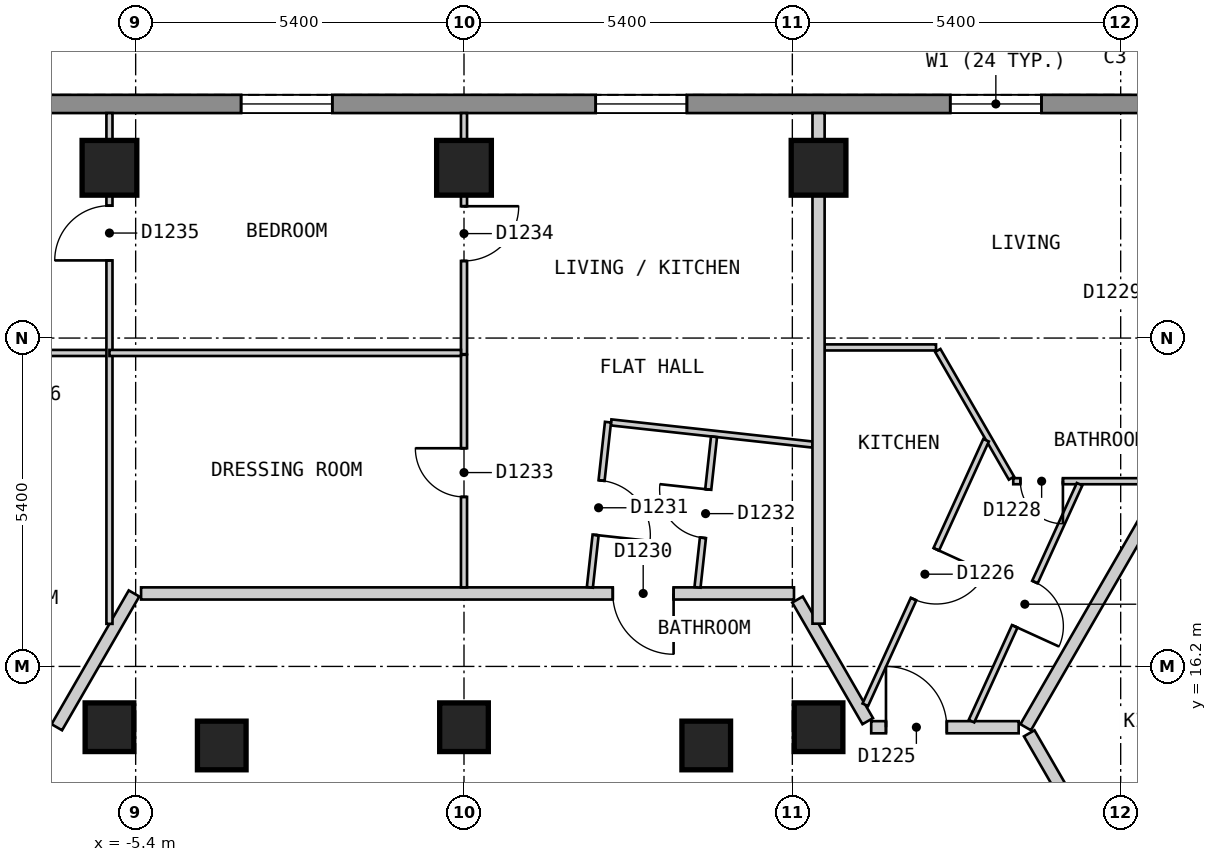
"""IFC4 building model, lengths in metres.
Left out: names, types, materials, properties, quantities, classifications, styles, units other than length and angle.
Written with IfcOpenShell. Run it as: python <this file> out.ifc"""

import sys

from ifc_helpers import new_model, si_unit, direction, frame, frame_2d, origin, origin_2d, place, context, subcontext, project, spatial, polyline, rectangle, outline, extrude, element, fill, save


model = new_model("IFC4")
c1 = context("Model", 3, precision=1e-05, world=origin(), true_north=direction((0.0, 1.0)))
c2 = subcontext(c1, "Body", "Model", "MODEL_VIEW")
j1 = project(units=[si_unit("LENGTHUNIT", "METRE"), si_unit("PLANEANGLEUNIT", "RADIAN")], contexts=[c1])
p1 = place(None, origin())
s1 = spatial("IfcSite", under=j1, at=p1, CompositionType="ELEMENT")
p2 = place(p1, origin())
s2 = spatial("IfcBuilding", under=s1, at=p2, CompositionType="ELEMENT")
p3 = place(p2, frame((0.0, 0.0, 129.6)))
s3 = spatial("IfcBuildingStorey", under=s2, at=p3, CompositionType="ELEMENT", Elevation=129.6)
for number, where, z_axis, x_axis in (
    (1, (5.831, 24.4, 0.0), (0.0, 0.0, 1.0), (-1.0, 0.0, 0.0)),
    (2, (0.0, 24.4, 0.0), (0.0, 0.0, 1.0), (-1.0, 0.0, 0.0)),
    (3, (-5.831, 24.4, 0.0), (0.0, 0.0, 1.0), (-1.0, 0.0, 0.0)),
):
    element("IfcColumn", number, at=place(p3, frame(where, z_axis=z_axis, x_axis=x_axis)), inside=s3, PredefinedType="COLUMN", context=c2, shape_type="SweptSolid", body=[
        extrude(rectangle(XDim=0.9, YDim=0.9, at=origin_2d()), origin(), (0.0, 0.0, 1.0), 3.0),
    ])
for number, where, z_axis, x_axis in (
    (4, (5.831, 15.2, 0.0), (0.0, 0.0, 1.0), (-1.0, 0.0, 0.0)),
    (5, (3.984, 14.9, 0.0), (0.0, 0.0, 1.0), (1.0, 0.0, 0.0)),
    (6, (0.0, 15.2, 0.0), (0.0, 0.0, 1.0), (-1.0, 0.0, 0.0)),
    (7, (-3.984, 14.9, 0.0), (0.0, 0.0, 1.0), (1.0, 0.0, 0.0)),
    (8, (-5.831, 15.2, 0.0), (0.0, 0.0, 1.0), (-1.0, 0.0, 0.0)),
):
    element("IfcColumn", number, at=place(p3, frame(where, z_axis=z_axis, x_axis=x_axis)), inside=s3, PredefinedType="COLUMN", context=c2, shape_type="SweptSolid", body=[
        extrude(rectangle(XDim=0.8, YDim=0.8, at=origin_2d()), origin(), (0.0, 0.0, 1.0), 3.0),
    ])
p4 = place(p3, frame((12.355, 25.45, 0.0), z_axis=(0.0, 0.0, 1.0), x_axis=(-1.0, 0.0, 0.0)))
e9 = element("IfcWall", 9, at=p4, inside=s3, PredefinedType="SOLIDWALL", context=c2, shape_type="SweptSolid", body=[
    extrude(outline(polyline([(0.0, -0.15), (24.71, -0.15), (24.63, 0.15), (0.08, 0.15), (0.0, -0.15)])), origin(), (0.0, 0.0, 1.0), 2.7),
])
p5 = place(p4, frame((2.858, 0.0, 0.15)))
e10 = element("IfcOpeningElement", 10, at=p5, cuts=e9, PredefinedType="OPENING", context=c2, shape_type="SweptSolid", body=[
    extrude(rectangle(XDim=1.5, YDim=2.1, at=frame_2d((0.75, 1.05))), frame((0.0, 0.16, 0.0), z_axis=(0.0, -1.0, 0.0), x_axis=(1.0, 0.0, 0.0)), (0.0, 0.0, 1.0), 0.32),
])
p6 = place(p4, frame((8.689, 0.0, 0.15)))
e11 = element("IfcOpeningElement", 11, at=p6, cuts=e9, PredefinedType="OPENING", context=c2, shape_type="SweptSolid", body=[
    extrude(rectangle(XDim=1.5, YDim=2.1, at=frame_2d((0.75, 1.05))), frame((0.0, 0.16, 0.0), z_axis=(0.0, -1.0, 0.0), x_axis=(1.0, 0.0, 0.0)), (0.0, 0.0, 1.0), 0.32),
])
p7 = place(p4, frame((14.521, 0.0, 0.15)))
e12 = element("IfcOpeningElement", 12, at=p7, cuts=e9, PredefinedType="OPENING", context=c2, shape_type="SweptSolid", body=[
    extrude(rectangle(XDim=1.5, YDim=2.1, at=frame_2d((0.75, 1.05))), frame((0.0, 0.16, 0.0), z_axis=(0.0, -1.0, 0.0), x_axis=(1.0, 0.0, 0.0)), (0.0, 0.0, 1.0), 0.32),
])
p8 = place(p4, frame((20.352, 0.0, 0.15)))
e13 = element("IfcOpeningElement", 13, at=p8, cuts=e9, PredefinedType="OPENING", context=c2, shape_type="SweptSolid", body=[
    extrude(rectangle(XDim=1.5, YDim=2.1, at=frame_2d((0.75, 1.05))), frame((0.0, 0.16, 0.0), z_axis=(0.0, -1.0, 0.0), x_axis=(1.0, 0.0, 0.0)), (0.0, 0.0, 1.0), 0.32),
])
p9 = place(p3, frame((5.485, 17.3, 0.0), z_axis=(0.0, 0.0, 1.0), x_axis=(0.500027479704, -0.866009537788, 0.0)))
e14 = element("IfcWall", 14, at=p9, inside=s3, PredefinedType="PARTITIONING", context=c2, shape_type="SweptSolid", body=[
    extrude(rectangle(XDim=2.309, YDim=0.2, at=frame_2d((1.155, 0.0))), origin(), (0.0, 0.0, 1.0), 2.7),
])
p10 = place(p3, frame((9.296, 15.1, 0.0), z_axis=(0.0, 0.0, 1.0), x_axis=(0.499974024244, -0.866040400375, 0.0)))
e15 = element("IfcWall", 15, at=p10, inside=s3, PredefinedType="PARTITIONING", context=c2, shape_type="SweptSolid", body=[
    extrude(rectangle(XDim=16.857, YDim=0.2, at=frame_2d((8.429, 0.0))), origin(), (0.0, 0.0, 1.0), 2.7),
])
p11 = place(p10, frame((5.187, 0.0, 0.0)))
e16 = element("IfcOpeningElement", 16, at=p11, cuts=e15, PredefinedType="OPENING", context=c2, shape_type="SweptSolid", body=[
    extrude(rectangle(XDim=1.0, YDim=2.1, at=frame_2d((0.5, 1.05))), frame((0.0, 0.11, 0.0), z_axis=(0.0, -1.0, 0.0), x_axis=(1.0, 0.0, 0.0)), (0.0, 0.0, 1.0), 0.22),
])
p12 = place(p3, frame((6.697, 15.2, 0.0), z_axis=(0.0, 0.0, 1.0), x_axis=(1.0, 0.0, 0.0)))
e17 = element("IfcWall", 17, at=p12, inside=s3, PredefinedType="PARTITIONING", context=c2, shape_type="SweptSolid", body=[
    extrude(rectangle(XDim=2.425, YDim=0.2, at=frame_2d((1.212, 0.0))), origin(), (0.0, 0.0, 1.0), 2.7),
])
p13 = place(p12, frame((0.243, 0.0, 0.0)))
e18 = element("IfcOpeningElement", 18, at=p13, cuts=e17, PredefinedType="OPENING", context=c2, shape_type="SweptSolid", body=[
    extrude(rectangle(XDim=1.0, YDim=2.1, at=frame_2d((0.5, 1.05))), frame((0.0, 0.11, 0.0), z_axis=(0.0, -1.0, 0.0), x_axis=(1.0, 0.0, 0.0)), (0.0, 0.0, 1.0), 0.22),
])
p14 = place(p3, frame((-5.311, 17.4, 0.0), z_axis=(0.0, 0.0, 1.0), x_axis=(1.0, 0.0, 0.0)))
e19 = element("IfcWall", 19, at=p14, inside=s3, PredefinedType="PARTITIONING", context=c2, shape_type="SweptSolid", body=[
    extrude(rectangle(XDim=10.738, YDim=0.2, at=frame_2d((5.369, 0.0))), origin(), (0.0, 0.0, 1.0), 2.7),
])
p15 = place(p14, frame((7.758, 0.0, 0.0)))
e20 = element("IfcOpeningElement", 20, at=p15, cuts=e19, PredefinedType="OPENING", context=c2, shape_type="SweptSolid", body=[
    extrude(rectangle(XDim=1.0, YDim=2.1, at=frame_2d((0.5, 1.05))), frame((0.0, 0.11, 0.0), z_axis=(0.0, -1.0, 0.0), x_axis=(1.0, 0.0, 0.0)), (0.0, 0.0, 1.0), 0.22),
])
p16 = place(p3, frame((-6.697, 15.2, 0.0), z_axis=(0.0, 0.0, 1.0), x_axis=(0.499963722229, 0.866046347752, 0.0)))
e21 = element("IfcWall", 21, at=p16, inside=s3, PredefinedType="PARTITIONING", context=c2, shape_type="SweptSolid", body=[
    extrude(rectangle(XDim=2.54, YDim=0.2, at=frame_2d((1.27, 0.0))), origin(), (0.0, 0.0, 1.0), 2.7),
])
p17 = place(p3, frame((7.792, 21.396, 0.0), z_axis=(0.0, 0.0, 1.0), x_axis=(0.499821239653, -0.866128586522, 0.0)))
e22 = element("IfcWall", 22, at=p17, inside=s3, PredefinedType="PARTITIONING", context=c2, shape_type="SweptSolid", body=[
    extrude(rectangle(XDim=2.425, YDim=0.1, at=frame_2d((1.212, 0.0))), origin(), (0.0, 0.0, 1.0), 2.7),
])
p18 = place(p3, frame((2.419, 20.213, 0.0), z_axis=(0.0, 0.0, 1.0), x_axis=(0.994022340378, -0.109176860325, 0.0)))
e23 = element("IfcWall", 23, at=p18, inside=s3, PredefinedType="PARTITIONING", context=c2, shape_type="SweptSolid", body=[
    extrude(rectangle(XDim=3.332, YDim=0.1, at=frame_2d((1.666, 0.0))), origin(), (0.0, 0.0, 1.0), 2.7),
])
p19 = place(p3, frame((0.0, 21.325, 0.0), z_axis=(0.0, 0.0, 1.0), x_axis=(0.0, -1.0, 0.0)))
e24 = element("IfcWall", 24, at=p19, inside=s3, PredefinedType="PARTITIONING", context=c2, shape_type="SweptSolid", body=[
    extrude(rectangle(XDim=3.825, YDim=0.1, at=frame_2d((1.913, 0.0))), origin(), (0.0, 0.0, 1.0), 2.7),
])
p20 = place(p19, frame((1.537, 0.0, 0.0)))
e25 = element("IfcOpeningElement", 25, at=p20, cuts=e24, PredefinedType="OPENING", context=c2, shape_type="SweptSolid", body=[
    extrude(rectangle(XDim=0.8, YDim=2.1, at=frame_2d((0.4, 1.05))), frame((0.0, 0.06, 0.0), z_axis=(0.0, -1.0, 0.0), x_axis=(1.0, 0.0, 0.0)), (0.0, 0.0, 1.0), 0.12),
])
p21 = place(p3, frame((9.033, 19.246, 0.0), z_axis=(0.0, 0.0, 1.0), x_axis=(1.0, 0.0, 0.0)))
e26 = element("IfcWall", 26, at=p21, inside=s3, PredefinedType="PARTITIONING", context=c2, shape_type="SweptSolid", body=[
    extrude(rectangle(XDim=2.541, YDim=0.1, at=frame_2d((1.271, 0.0))), origin(), (0.0, 0.0, 1.0), 2.7),
])
p22 = place(p21, frame((0.117, 0.0, 0.0)))
e27 = element("IfcOpeningElement", 27, at=p22, cuts=e26, PredefinedType="OPENING", context=c2, shape_type="SweptSolid", body=[
    extrude(rectangle(XDim=0.7, YDim=2.1, at=frame_2d((0.35, 1.05))), frame((0.0, 0.06, 0.0), z_axis=(0.0, -1.0, 0.0), x_axis=(1.0, 0.0, 0.0)), (0.0, 0.0, 1.0), 0.12),
])
p23 = place(p3, frame((-7.652, 21.355, 0.0), z_axis=(0.0, 0.0, 1.0), x_axis=(1.0, 0.0, 0.0)))
e28 = element("IfcWall", 28, at=p23, inside=s3, PredefinedType="PARTITIONING", context=c2, shape_type="SweptSolid", body=[
    extrude(rectangle(XDim=1.821, YDim=0.1, at=frame_2d((0.911, 0.0))), origin(), (0.0, 0.0, 1.0), 2.7),
])
p24 = place(p3, frame((5.931, 21.446, 0.0), z_axis=(0.0, 0.0, 1.0), x_axis=(1.0, 0.0, 0.0)))
e29 = element("IfcWall", 29, at=p24, inside=s3, PredefinedType="PARTITIONING", context=c2, shape_type="SweptSolid", body=[
    extrude(rectangle(XDim=1.832, YDim=0.1, at=frame_2d((0.916, 0.0))), origin(), (0.0, 0.0, 1.0), 2.7),
])
p25 = place(p3, frame((8.346, 15.3, 0.0), z_axis=(0.0, 0.0, 1.0), x_axis=(0.415189790387, 0.909734817383, 0.0)))
e30 = element("IfcWall", 30, at=p25, inside=s3, PredefinedType="PARTITIONING", context=c2, shape_type="SweptSolid", body=[
    extrude(rectangle(XDim=4.282, YDim=0.1, at=frame_2d((2.141, 0.0))), origin(), (0.0, 0.0, 1.0), 2.7),
])
p26 = place(p25, frame((1.714, 0.0, 0.0)))
e31 = element("IfcOpeningElement", 31, at=p26, cuts=e30, PredefinedType="OPENING", context=c2, shape_type="SweptSolid", body=[
    extrude(rectangle(XDim=0.8, YDim=2.1, at=frame_2d((0.4, 1.05))), frame((0.0, 0.06, 0.0), z_axis=(0.0, -1.0, 0.0), x_axis=(1.0, 0.0, 0.0)), (0.0, 0.0, 1.0), 0.12),
])
p27 = place(p3, frame((6.6, 15.569, 0.0), z_axis=(0.0, 0.0, 1.0), x_axis=(0.415221636251, 0.909720282718, 0.0)))
e32 = element("IfcWall", 32, at=p27, inside=s3, PredefinedType="PARTITIONING", context=c2, shape_type="SweptSolid", body=[
    extrude(rectangle(XDim=4.783, YDim=0.1, at=frame_2d((2.391, 0.0))), origin(), (0.0, 0.0, 1.0), 2.7),
])
p28 = place(p27, frame((1.911, 0.0, 0.0)))
e33 = element("IfcOpeningElement", 33, at=p28, cuts=e32, PredefinedType="OPENING", context=c2, shape_type="SweptSolid", body=[
    extrude(rectangle(XDim=0.9, YDim=2.1, at=frame_2d((0.45, 1.05))), frame((0.0, 0.06, 0.0), z_axis=(0.0, -1.0, 0.0), x_axis=(1.0, 0.0, 0.0)), (0.0, 0.0, 1.0), 0.12),
])
p29 = place(p3, frame((2.07, 17.5, 0.0), z_axis=(0.0, 0.0, 1.0), x_axis=(0.108970694085, 0.994044962681, 0.0)))
e34 = element("IfcWall", 34, at=p29, inside=s3, PredefinedType="PARTITIONING", context=c2, shape_type="SweptSolid", body=[
    extrude(rectangle(XDim=2.733, YDim=0.1, at=frame_2d((1.367, 0.0))), origin(), (0.0, 0.0, 1.0), 2.7),
])
p30 = place(p29, frame((0.867, 0.0, 0.0)))
e35 = element("IfcOpeningElement", 35, at=p30, cuts=e34, PredefinedType="OPENING", context=c2, shape_type="SweptSolid", body=[
    extrude(rectangle(XDim=0.9, YDim=2.1, at=frame_2d((0.45, 1.05))), frame((0.0, 0.06, 0.0), z_axis=(0.0, -1.0, 0.0), x_axis=(1.0, 0.0, 0.0)), (0.0, 0.0, 1.0), 0.12),
])
p31 = place(p3, frame((3.84, 17.5, 0.0), z_axis=(0.0, 0.0, 1.0), x_axis=(0.109141067014, 0.994026271027, 0.0)))
e36 = element("IfcWall", 36, at=p31, inside=s3, PredefinedType="PARTITIONING", context=c2, shape_type="SweptSolid", body=[
    extrude(rectangle(XDim=2.492, YDim=0.1, at=frame_2d((1.246, 0.0))), origin(), (0.0, 0.0, 1.0), 2.7),
])
p32 = place(p31, frame((0.82, 0.0, 0.0)))
e37 = element("IfcOpeningElement", 37, at=p32, cuts=e36, PredefinedType="OPENING", context=c2, shape_type="SweptSolid", body=[
    extrude(rectangle(XDim=0.8, YDim=2.1, at=frame_2d((0.4, 1.05))), frame((0.0, 0.06, 0.0), z_axis=(0.0, -1.0, 0.0), x_axis=(1.0, 0.0, 0.0)), (0.0, 0.0, 1.0), 0.12),
])
p33 = place(p3, frame((0.0, 21.335, 0.0), z_axis=(0.0, 0.0, 1.0), x_axis=(0.0, 1.0, 0.0)))
e38 = element("IfcWall", 38, at=p33, inside=s3, PredefinedType="PARTITIONING", context=c2, shape_type="SweptSolid", body=[
    extrude(rectangle(XDim=3.965, YDim=0.1, at=frame_2d((1.982, 0.0))), origin(), (0.0, 0.0, 1.0), 2.7),
])
p34 = place(p33, frame((1.533, 0.0, 0.0)))
e39 = element("IfcOpeningElement", 39, at=p34, cuts=e38, PredefinedType="OPENING", context=c2, shape_type="SweptSolid", body=[
    extrude(rectangle(XDim=0.9, YDim=2.1, at=frame_2d((0.45, 1.05))), frame((0.0, 0.06, 0.0), z_axis=(0.0, -1.0, 0.0), x_axis=(1.0, 0.0, 0.0)), (0.0, 0.0, 1.0), 0.12),
])
p35 = place(p3, frame((-5.831, 16.9, 0.0), z_axis=(0.0, 0.0, 1.0), x_axis=(0.0, 1.0, 0.0)))
e40 = element("IfcWall", 40, at=p35, inside=s3, PredefinedType="PARTITIONING", context=c2, shape_type="SweptSolid", body=[
    extrude(rectangle(XDim=8.4, YDim=0.1, at=frame_2d((4.2, 0.0))), origin(), (0.0, 0.0, 1.0), 2.7),
])
p36 = place(p35, frame((5.977, 0.0, 0.0)))
e41 = element("IfcOpeningElement", 41, at=p36, cuts=e40, PredefinedType="OPENING", context=c2, shape_type="SweptSolid", body=[
    extrude(rectangle(XDim=0.9, YDim=2.1, at=frame_2d((0.45, 1.05))), frame((0.0, 0.06, 0.0), z_axis=(0.0, -1.0, 0.0), x_axis=(1.0, 0.0, 0.0)), (0.0, 0.0, 1.0), 0.12),
])
p37 = place(p3, frame((10.854, 12.6, 0.0), z_axis=(0.0, 0.0, 1.0), x_axis=(0.8660642533, 0.499932704626, 0.0)))
e42 = element("IfcWall", 42, at=p37, inside=s3, PredefinedType="PARTITIONING", context=c2, shape_type="SweptSolid", body=[
    extrude(rectangle(XDim=3.786, YDim=0.1, at=frame_2d((1.893, 0.0))), origin(), (0.0, 0.0, 1.0), 2.7),
])
p38 = place(p37, frame((1.393, 0.0, 0.0)))
e43 = element("IfcOpeningElement", 43, at=p38, cuts=e42, PredefinedType="OPENING", context=c2, shape_type="SweptSolid", body=[
    extrude(rectangle(XDim=0.9, YDim=2.1, at=frame_2d((0.45, 1.05))), frame((0.0, 0.06, 0.0), z_axis=(0.0, -1.0, 0.0), x_axis=(1.0, 0.0, 0.0)), (0.0, 0.0, 1.0), 0.12),
])
p39 = place(p3, frame((9.238, 15.2, 0.0), z_axis=(0.0, 0.0, 1.0), x_axis=(0.499890453443, 0.866088641281, 0.0)))
e44 = element("IfcWall", 44, at=p39, inside=s3, PredefinedType="PARTITIONING", context=c2, shape_type="SweptSolid", body=[
    extrude(rectangle(XDim=4.487, YDim=0.2, at=frame_2d((2.243, 0.0))), origin(), (0.0, 0.0, 1.0), 2.7),
])
p40 = place(p3, frame((5.831, 16.903, 0.0), z_axis=(0.0, 0.0, 1.0), x_axis=(0.0, 1.0, 0.0)))
e45 = element("IfcWall", 45, at=p40, inside=s3, PredefinedType="PARTITIONING", context=c2, shape_type="SweptSolid", body=[
    extrude(rectangle(XDim=8.397, YDim=0.2, at=frame_2d((4.198, 0.0))), origin(), (0.0, 0.0, 1.0), 2.7),
])
p41 = place(p3, frame((-5.831, 21.355, 0.0), z_axis=(0.0, 0.0, 1.0), x_axis=(1.0, 0.0, 0.0)))
e46 = element("IfcWall", 46, at=p41, inside=s3, PredefinedType="PARTITIONING", context=c2, shape_type="SweptSolid", body=[
    extrude(rectangle(XDim=5.781, YDim=0.1, at=frame_2d((2.891, 0.0))), origin(), (0.0, 0.0, 1.0), 2.7),
])
p42 = place(p5, origin())
e47 = element("IfcWindow", 47, at=p42, inside=s3, PartitioningType="SINGLE_PANEL", PredefinedType="WINDOW", context=c2, shape_type="SweptSolid", body=[
    extrude(rectangle(XDim=1.5, YDim=2.1, at=frame_2d((0.75, 1.05))), frame((0.0, 0.03, 0.0), z_axis=(0.0, -1.0, 0.0), x_axis=(1.0, 0.0, 0.0)), (0.0, 0.0, 1.0), 0.06),
])
fill(e10, e47)
p43 = place(p6, origin())
e48 = element("IfcWindow", 48, at=p43, inside=s3, PartitioningType="SINGLE_PANEL", PredefinedType="WINDOW", context=c2, shape_type="SweptSolid", body=[
    extrude(rectangle(XDim=1.5, YDim=2.1, at=frame_2d((0.75, 1.05))), frame((0.0, 0.03, 0.0), z_axis=(0.0, -1.0, 0.0), x_axis=(1.0, 0.0, 0.0)), (0.0, 0.0, 1.0), 0.06),
])
fill(e11, e48)
p44 = place(p7, origin())
e49 = element("IfcWindow", 49, at=p44, inside=s3, PartitioningType="SINGLE_PANEL", PredefinedType="WINDOW", context=c2, shape_type="SweptSolid", body=[
    extrude(rectangle(XDim=1.5, YDim=2.1, at=frame_2d((0.75, 1.05))), frame((0.0, 0.03, 0.0), z_axis=(0.0, -1.0, 0.0), x_axis=(1.0, 0.0, 0.0)), (0.0, 0.0, 1.0), 0.06),
])
fill(e12, e49)
p45 = place(p13, origin())
e50 = element("IfcDoor", 50, at=p45, inside=s3, OperationType="SINGLE_SWING_LEFT", PredefinedType="DOOR", context=c2, shape_type="SweptSolid", body=[
    extrude(rectangle(XDim=1.0, YDim=2.1, at=frame_2d((0.5, 1.05))), frame((0.0, 0.025, 0.0), z_axis=(0.0, -1.0, 0.0), x_axis=(1.0, 0.0, 0.0)), (0.0, 0.0, 1.0), 0.05),
])
fill(e18, e50)
p46 = place(p28, origin())
e51 = element("IfcDoor", 51, at=p46, inside=s3, OperationType="SINGLE_SWING_RIGHT", PredefinedType="DOOR", context=c2, shape_type="SweptSolid", body=[
    extrude(rectangle(XDim=0.9, YDim=2.1, at=frame_2d((0.45, 1.05))), frame((0.0, 0.025, 0.0), z_axis=(0.0, -1.0, 0.0), x_axis=(1.0, 0.0, 0.0)), (0.0, 0.0, 1.0), 0.05),
])
fill(e33, e51)
p47 = place(p26, origin())
e52 = element("IfcDoor", 52, at=p47, inside=s3, OperationType="SINGLE_SWING_LEFT", PredefinedType="DOOR", context=c2, shape_type="SweptSolid", body=[
    extrude(rectangle(XDim=0.8, YDim=2.1, at=frame_2d((0.4, 1.05))), frame((0.0, 0.025, 0.0), z_axis=(0.0, -1.0, 0.0), x_axis=(1.0, 0.0, 0.0)), (0.0, 0.0, 1.0), 0.05),
])
fill(e31, e52)
p48 = place(p22, origin())
e53 = element("IfcDoor", 53, at=p48, inside=s3, OperationType="SINGLE_SWING_RIGHT", PredefinedType="DOOR", context=c2, shape_type="SweptSolid", body=[
    extrude(rectangle(XDim=0.7, YDim=2.1, at=frame_2d((0.35, 1.05))), frame((0.0, 0.025, 0.0), z_axis=(0.0, -1.0, 0.0), x_axis=(1.0, 0.0, 0.0)), (0.0, 0.0, 1.0), 0.05),
])
fill(e27, e53)
p49 = place(p15, origin())
e54 = element("IfcDoor", 54, at=p49, inside=s3, OperationType="SINGLE_SWING_RIGHT", PredefinedType="DOOR", context=c2, shape_type="SweptSolid", body=[
    extrude(rectangle(XDim=1.0, YDim=2.1, at=frame_2d((0.5, 1.05))), frame((0.0, 0.025, 0.0), z_axis=(0.0, -1.0, 0.0), x_axis=(1.0, 0.0, 0.0)), (0.0, 0.0, 1.0), 0.05),
])
fill(e20, e54)
p50 = place(p30, origin())
e55 = element("IfcDoor", 55, at=p50, inside=s3, OperationType="SINGLE_SWING_LEFT", PredefinedType="DOOR", context=c2, shape_type="SweptSolid", body=[
    extrude(rectangle(XDim=0.9, YDim=2.1, at=frame_2d((0.45, 1.05))), frame((0.0, 0.025, 0.0), z_axis=(0.0, -1.0, 0.0), x_axis=(1.0, 0.0, 0.0)), (0.0, 0.0, 1.0), 0.05),
])
fill(e35, e55)
p51 = place(p32, origin())
e56 = element("IfcDoor", 56, at=p51, inside=s3, OperationType="SINGLE_SWING_RIGHT", PredefinedType="DOOR", context=c2, shape_type="SweptSolid", body=[
    extrude(rectangle(XDim=0.8, YDim=2.1, at=frame_2d((0.4, 1.05))), frame((0.0, 0.025, 0.0), z_axis=(0.0, -1.0, 0.0), x_axis=(1.0, 0.0, 0.0)), (0.0, 0.0, 1.0), 0.05),
])
fill(e37, e56)
p52 = place(p20, origin())
e57 = element("IfcDoor", 57, at=p52, inside=s3, OperationType="SINGLE_SWING_LEFT", PredefinedType="DOOR", context=c2, shape_type="SweptSolid", body=[
    extrude(rectangle(XDim=0.8, YDim=2.1, at=frame_2d((0.4, 1.05))), frame((0.0, 0.025, 0.0), z_axis=(0.0, -1.0, 0.0), x_axis=(1.0, 0.0, 0.0)), (0.0, 0.0, 1.0), 0.05),
])
fill(e25, e57)
p53 = place(p34, origin())
e58 = element("IfcDoor", 58, at=p53, inside=s3, OperationType="SINGLE_SWING_RIGHT", PredefinedType="DOOR", context=c2, shape_type="SweptSolid", body=[
    extrude(rectangle(XDim=0.9, YDim=2.1, at=frame_2d((0.45, 1.05))), frame((0.0, 0.025, 0.0), z_axis=(0.0, -1.0, 0.0), x_axis=(1.0, 0.0, 0.0)), (0.0, 0.0, 1.0), 0.05),
])
fill(e39, e58)
p54 = place(p36, origin())
e59 = element("IfcDoor", 59, at=p54, inside=s3, OperationType="SINGLE_SWING_LEFT", PredefinedType="DOOR", context=c2, shape_type="SweptSolid", body=[
    extrude(rectangle(XDim=0.9, YDim=2.1, at=frame_2d((0.45, 1.05))), frame((0.0, 0.025, 0.0), z_axis=(0.0, -1.0, 0.0), x_axis=(1.0, 0.0, 0.0)), (0.0, 0.0, 1.0), 0.05),
])
fill(e41, e59)
save(model, sys.argv[1])
